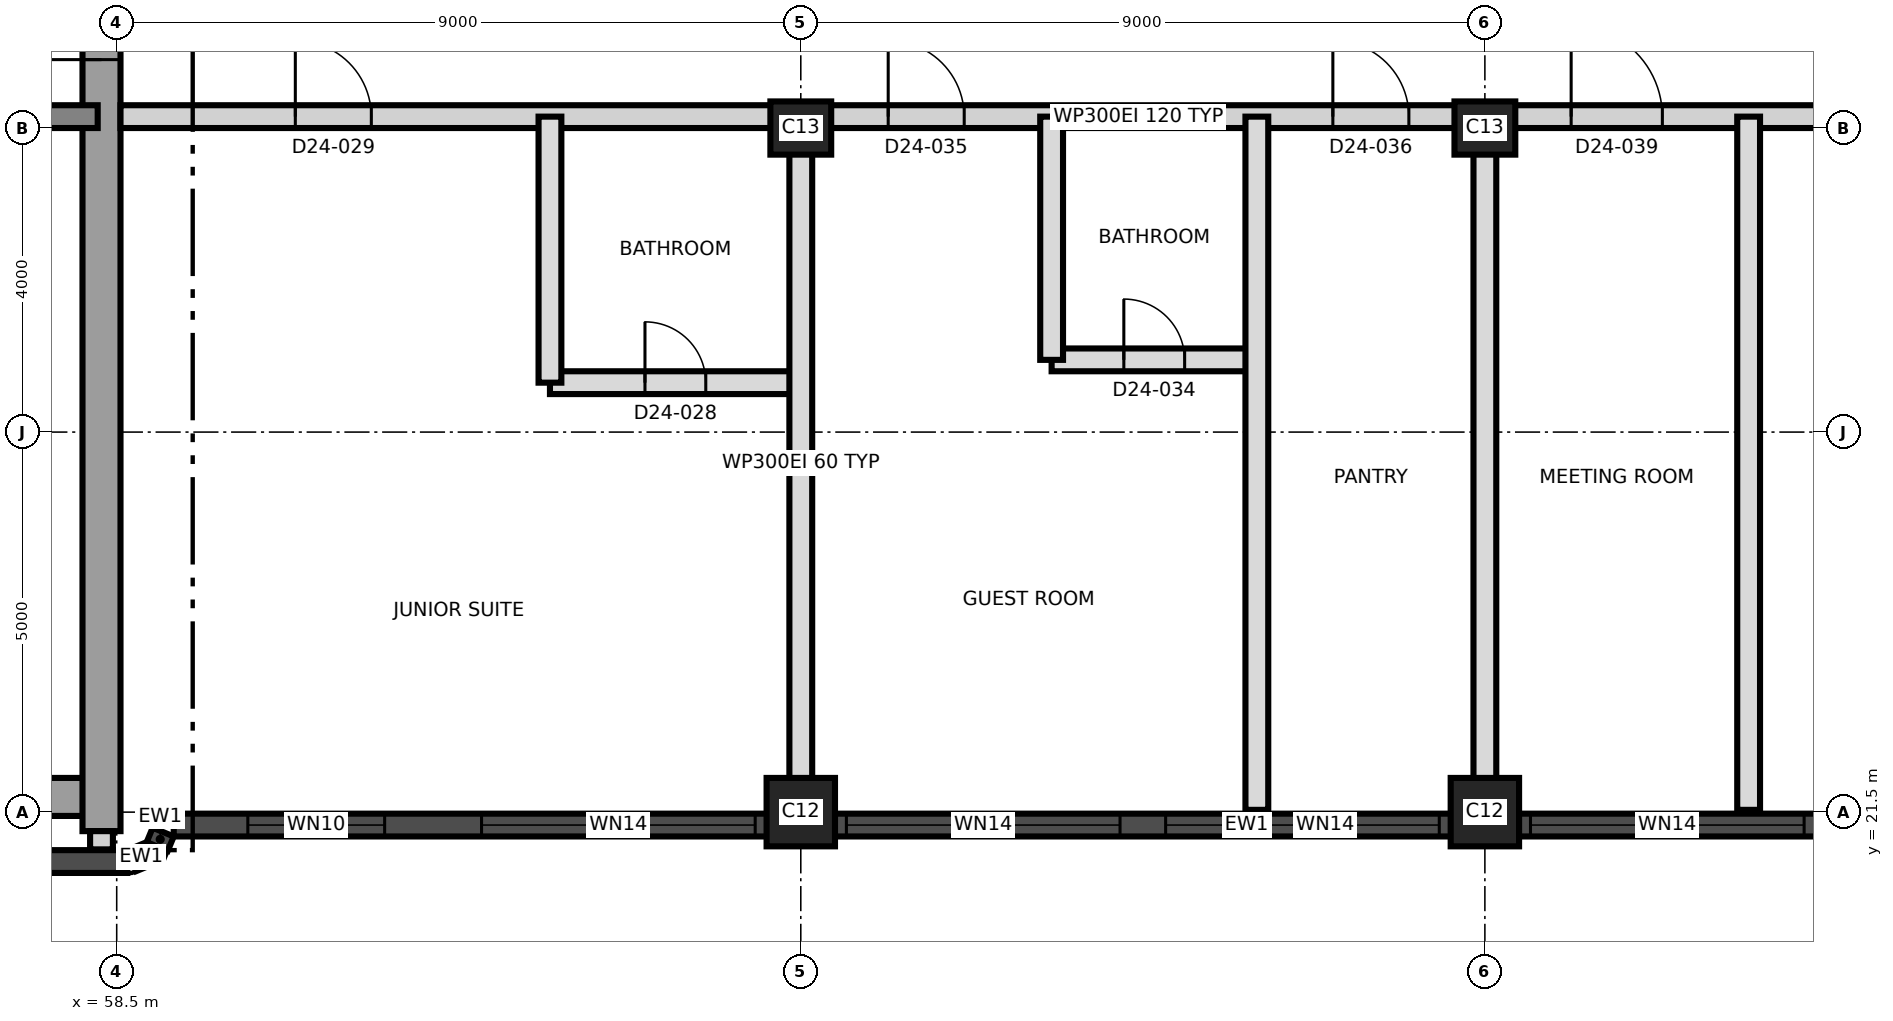
"""IFC4 building model, lengths in metres.
Left out: names, types, materials, properties, quantities, classifications, styles, units other than length and angle.
Written with IfcOpenShell. Run it as: python <this file> out.ifc"""

import sys

from ifc_helpers import new_model, si_unit, direction, frame, frame_2d, origin, origin_2d, place, context, subcontext, project, spatial, rectangle, extrude, element, fill, save


model = new_model("IFC4")
c1 = context("Model", 3, precision=1e-05, world=origin(), true_north=direction((0.0, 1.0)))
c2 = subcontext(c1, "Body", "Model", "MODEL_VIEW")
j1 = project(units=[si_unit("LENGTHUNIT", "METRE"), si_unit("PLANEANGLEUNIT", "RADIAN")], contexts=[c1])
p1 = place(None, origin())
s1 = spatial("IfcSite", under=j1, at=p1, CompositionType="ELEMENT")
p2 = place(p1, origin())
s2 = spatial("IfcBuilding", under=s1, at=p2, CompositionType="ELEMENT")
p3 = place(p2, frame((0.0, 0.0, 221.7)))
s3 = spatial("IfcBuildingStorey", under=s2, at=p3, CompositionType="ELEMENT", Elevation=221.7)
p4 = place(p3, frame((31.25, 21.7, 0.0), z_axis=(0.0, 0.0, 1.0), x_axis=(1.0, 0.0, 0.0)))
e1 = element("IfcWall", 1, at=p4, inside=s3, PredefinedType="SHEAR", context=c2, shape_type="SweptSolid", body=[
    extrude(rectangle(XDim=27.0, YDim=0.5, at=frame_2d((13.5, 0.0))), origin(), (0.0, 0.0, 1.0), 3.7),
])
p5 = place(p3, frame((58.3, 21.25, 0.0), z_axis=(0.0, 0.0, 1.0), x_axis=(0.0, 1.0, 0.0)))
e2 = element("IfcWall", 2, at=p5, inside=s3, PredefinedType="SHEAR", context=c2, shape_type="SweptSolid", body=[
    extrude(rectangle(XDim=18.5, YDim=0.5, at=frame_2d((9.25, 0.0))), origin(), (0.0, 0.0, 1.0), 3.7),
])
p6 = place(p5, frame((10.15, 0.0, 0.0)))
e3 = element("IfcOpeningElement", 3, at=p6, cuts=e2, PredefinedType="OPENING", context=c2, shape_type="SweptSolid", body=[
    extrude(rectangle(XDim=1.2, YDim=2.1, at=frame_2d((0.6, 1.05))), frame((0.0, 0.26, 0.0), z_axis=(0.0, -1.0, 0.0), x_axis=(1.0, 0.0, 0.0)), (0.0, 0.0, 1.0), 0.52),
])
p7 = place(p3, frame((31.75, 30.65, 0.0), z_axis=(0.0, 0.0, 1.0), x_axis=(1.0, 0.0, 0.0)))
e4 = element("IfcWall", 4, at=p7, inside=s3, PredefinedType="SHEAR", context=c2, shape_type="SweptSolid", body=[
    extrude(rectangle(XDim=26.5, YDim=0.3, at=frame_2d((13.25, 0.0))), origin(), (0.0, 0.0, 1.0), 3.7),
])
p8 = place(p7, frame((24.75, 0.0, 0.0)))
e5 = element("IfcOpeningElement", 5, at=p8, cuts=e4, PredefinedType="OPENING", context=c2, shape_type="SweptSolid", body=[
    extrude(rectangle(XDim=1.0, YDim=2.1, at=frame_2d((0.5, 1.05))), frame((0.0, 0.16, 0.0), z_axis=(0.0, -1.0, 0.0), x_axis=(1.0, 0.0, 0.0)), (0.0, 0.0, 1.0), 0.32),
])
for number, where, z_axis, x_axis in (
    (6, (67.5, 21.5, 0.0), (0.0, 0.0, 1.0), (1.0, 0.0, 0.0)),
    (7, (76.5, 21.5, 0.0), (0.0, 0.0, 1.0), (1.0, 0.0, 0.0)),
):
    element("IfcColumn", number, at=place(p3, frame(where, z_axis=z_axis, x_axis=x_axis)), inside=s3, PredefinedType="COLUMN", context=c2, shape_type="SweptSolid", body=[
        extrude(rectangle(XDim=0.9, YDim=0.9, at=origin_2d()), origin(), (0.0, 0.0, 1.0), 3.7),
    ])
for number, where, z_axis, x_axis in (
    (8, (67.5, 30.5, 0.0), (0.0, 0.0, 1.0), (1.0, 0.0, 0.0)),
    (9, (76.5, 30.5, 0.0), (0.0, 0.0, 1.0), (1.0, 0.0, 0.0)),
):
    element("IfcColumn", number, at=place(p3, frame(where, z_axis=z_axis, x_axis=x_axis)), inside=s3, PredefinedType="COLUMN", context=c2, shape_type="SweptSolid", body=[
        extrude(rectangle(XDim=0.8, YDim=0.7, at=origin_2d()), origin(), (0.0, 0.0, 1.0), 3.7),
    ])
p9 = place(p3, frame((31.36, 20.85, 0.0), z_axis=(0.0, 0.0, 1.0), x_axis=(1.0, 0.0, 0.0)))
e10 = element("IfcWall", 10, at=p9, inside=s3, PredefinedType="SOLIDWALL", context=c2, shape_type="SweptSolid", body=[
    extrude(rectangle(XDim=27.281, YDim=0.3, at=frame_2d((13.64, 0.0))), origin(), (0.0, 0.0, 1.0), 3.4),
])
p10 = place(p3, frame((58.698, 20.861, 0.0), z_axis=(0.0, 0.0, 1.0), x_axis=(0.923757413239, 0.38297812142, 0.0)))
e11 = element("IfcWall", 11, at=p10, inside=s3, PredefinedType="SOLIDWALL", context=c2, shape_type="SweptSolid", body=[
    extrude(rectangle(XDim=0.275, YDim=0.3, at=frame_2d((0.138, 0.0))), origin(), (0.0, 0.0, 1.0), 3.4),
])
p11 = place(p3, frame((59.033, 21.048, 0.0), z_axis=(0.0, 0.0, 1.0), x_axis=(0.383262727373, 0.923639367831, 0.0)))
e12 = element("IfcWall", 12, at=p11, inside=s3, PredefinedType="SOLIDWALL", context=c2, shape_type="SweptSolid", body=[
    extrude(rectangle(XDim=0.205, YDim=0.3, at=frame_2d((0.103, 0.0))), origin(), (0.0, 0.0, 1.0), 3.4),
])
p12 = place(p3, frame((59.25, 21.33, 0.0), z_axis=(0.0, 0.0, 1.0), x_axis=(1.0, 0.0, 0.0)))
e13 = element("IfcWall", 13, at=p12, inside=s3, PredefinedType="SOLIDWALL", context=c2, shape_type="SweptSolid", body=[
    extrude(rectangle(XDim=28.234, YDim=0.3, at=frame_2d((14.117, 0.0))), origin(), (0.0, 0.0, 1.0), 3.4),
])
p13 = place(p12, frame((0.975, 0.0, 0.3)))
e14 = element("IfcOpeningElement", 14, at=p13, cuts=e13, PredefinedType="OPENING", context=c2, shape_type="SweptSolid", body=[
    extrude(rectangle(XDim=1.8, YDim=2.4, at=frame_2d((0.9, 1.2))), frame((0.0, 0.16, 0.0), z_axis=(0.0, -1.0, 0.0), x_axis=(1.0, 0.0, 0.0)), (0.0, 0.0, 1.0), 0.32),
])
p14 = place(p12, frame((4.05, 0.0, 0.9)))
e15 = element("IfcOpeningElement", 15, at=p14, cuts=e13, PredefinedType="OPENING", context=c2, shape_type="SweptSolid", body=[
    extrude(rectangle(XDim=3.6, YDim=1.7, at=frame_2d((1.8, 0.85))), frame((0.0, 0.16, 0.0), z_axis=(0.0, -1.0, 0.0), x_axis=(1.0, 0.0, 0.0)), (0.0, 0.0, 1.0), 0.32),
])
p15 = place(p12, frame((8.85, 0.0, 0.9)))
e16 = element("IfcOpeningElement", 16, at=p15, cuts=e13, PredefinedType="OPENING", context=c2, shape_type="SweptSolid", body=[
    extrude(rectangle(XDim=3.6, YDim=1.7, at=frame_2d((1.8, 0.85))), frame((0.0, 0.16, 0.0), z_axis=(0.0, -1.0, 0.0), x_axis=(1.0, 0.0, 0.0)), (0.0, 0.0, 1.0), 0.32),
])
p16 = place(p12, frame((13.05, 0.0, 0.9)))
e17 = element("IfcOpeningElement", 17, at=p16, cuts=e13, PredefinedType="OPENING", context=c2, shape_type="SweptSolid", body=[
    extrude(rectangle(XDim=3.6, YDim=1.7, at=frame_2d((1.8, 0.85))), frame((0.0, 0.16, 0.0), z_axis=(0.0, -1.0, 0.0), x_axis=(1.0, 0.0, 0.0)), (0.0, 0.0, 1.0), 0.32),
])
p17 = place(p12, frame((17.85, 0.0, 0.9)))
e18 = element("IfcOpeningElement", 18, at=p17, cuts=e13, PredefinedType="OPENING", context=c2, shape_type="SweptSolid", body=[
    extrude(rectangle(XDim=3.6, YDim=1.7, at=frame_2d((1.8, 0.85))), frame((0.0, 0.16, 0.0), z_axis=(0.0, -1.0, 0.0), x_axis=(1.0, 0.0, 0.0)), (0.0, 0.0, 1.0), 0.32),
])
p18 = place(p12, frame((22.05, 0.0, 0.9)))
e19 = element("IfcOpeningElement", 19, at=p18, cuts=e13, PredefinedType="OPENING", context=c2, shape_type="SweptSolid", body=[
    extrude(rectangle(XDim=3.6, YDim=1.7, at=frame_2d((1.8, 0.85))), frame((0.0, 0.16, 0.0), z_axis=(0.0, -1.0, 0.0), x_axis=(1.0, 0.0, 0.0)), (0.0, 0.0, 1.0), 0.32),
])
p19 = place(p3, frame((64.2, 27.15, 0.0), z_axis=(0.0, 0.0, 1.0), x_axis=(1.0, 0.0, 0.0)))
e20 = element("IfcWall", 20, at=p19, inside=s3, PredefinedType="PARTITIONING", context=c2, shape_type="SweptSolid", body=[
    extrude(rectangle(XDim=3.3, YDim=0.3, at=frame_2d((1.65, 0.0))), origin(), (0.0, 0.0, 1.0), 3.4),
])
p20 = place(p19, frame((1.25, 0.0, 0.0)))
e21 = element("IfcOpeningElement", 21, at=p20, cuts=e20, PredefinedType="OPENING", context=c2, shape_type="SweptSolid", body=[
    extrude(rectangle(XDim=0.8, YDim=2.1, at=frame_2d((0.4, 1.05))), frame((0.0, 0.16, 0.0), z_axis=(0.0, -1.0, 0.0), x_axis=(1.0, 0.0, 0.0)), (0.0, 0.0, 1.0), 0.32),
])
p21 = place(p3, frame((70.8, 27.45, 0.0), z_axis=(0.0, 0.0, 1.0), x_axis=(1.0, 0.0, 0.0)))
e22 = element("IfcWall", 22, at=p21, inside=s3, PredefinedType="PARTITIONING", context=c2, shape_type="SweptSolid", body=[
    extrude(rectangle(XDim=2.7, YDim=0.3, at=frame_2d((1.35, 0.0))), origin(), (0.0, 0.0, 1.0), 3.4),
])
p22 = place(p21, frame((0.95, 0.0, 0.0)))
e23 = element("IfcOpeningElement", 23, at=p22, cuts=e22, PredefinedType="OPENING", context=c2, shape_type="SweptSolid", body=[
    extrude(rectangle(XDim=0.8, YDim=2.1, at=frame_2d((0.4, 1.05))), frame((0.0, 0.16, 0.0), z_axis=(0.0, -1.0, 0.0), x_axis=(1.0, 0.0, 0.0)), (0.0, 0.0, 1.0), 0.32),
])
p23 = place(p3, frame((58.55, 30.65, 0.0), z_axis=(0.0, 0.0, 1.0), x_axis=(1.0, 0.0, 0.0)))
e24 = element("IfcWall", 24, at=p23, inside=s3, PredefinedType="PARTITIONING", context=c2, shape_type="SweptSolid", body=[
    extrude(rectangle(XDim=26.78, YDim=0.3, at=frame_2d((13.39, 0.0))), origin(), (0.0, 0.0, 1.0), 3.4),
])
p24 = place(p23, frame((2.3, 0.0, 0.0)))
e25 = element("IfcOpeningElement", 25, at=p24, cuts=e24, PredefinedType="OPENING", context=c2, shape_type="SweptSolid", body=[
    extrude(rectangle(XDim=1.0, YDim=2.4, at=frame_2d((0.5, 1.2))), frame((0.0, 0.16, 0.0), z_axis=(0.0, -1.0, 0.0), x_axis=(1.0, 0.0, 0.0)), (0.0, 0.0, 1.0), 0.32),
])
p25 = place(p23, frame((10.1, 0.0, 0.0)))
e26 = element("IfcOpeningElement", 26, at=p25, cuts=e24, PredefinedType="OPENING", context=c2, shape_type="SweptSolid", body=[
    extrude(rectangle(XDim=1.0, YDim=2.1, at=frame_2d((0.5, 1.05))), frame((0.0, 0.16, 0.0), z_axis=(0.0, -1.0, 0.0), x_axis=(1.0, 0.0, 0.0)), (0.0, 0.0, 1.0), 0.32),
])
p26 = place(p23, frame((15.95, 0.0, 0.0)))
e27 = element("IfcOpeningElement", 27, at=p26, cuts=e24, PredefinedType="OPENING", context=c2, shape_type="SweptSolid", body=[
    extrude(rectangle(XDim=1.0, YDim=2.1, at=frame_2d((0.5, 1.05))), frame((0.0, 0.16, 0.0), z_axis=(0.0, -1.0, 0.0), x_axis=(1.0, 0.0, 0.0)), (0.0, 0.0, 1.0), 0.32),
])
p27 = place(p23, frame((19.085, 0.0, 0.0)))
e28 = element("IfcOpeningElement", 28, at=p27, cuts=e24, PredefinedType="OPENING", context=c2, shape_type="SweptSolid", body=[
    extrude(rectangle(XDim=1.2, YDim=2.1, at=frame_2d((0.6, 1.05))), frame((0.0, 0.16, 0.0), z_axis=(0.0, -1.0, 0.0), x_axis=(1.0, 0.0, 0.0)), (0.0, 0.0, 1.0), 0.32),
])
p28 = place(p23, frame((22.335, 0.0, 0.0)))
e29 = element("IfcOpeningElement", 29, at=p28, cuts=e24, PredefinedType="OPENING", context=c2, shape_type="SweptSolid", body=[
    extrude(rectangle(XDim=1.0, YDim=2.1, at=frame_2d((0.5, 1.05))), frame((0.0, 0.16, 0.0), z_axis=(0.0, -1.0, 0.0), x_axis=(1.0, 0.0, 0.0)), (0.0, 0.0, 1.0), 0.32),
])
p29 = place(p3, frame((64.2, 27.15, 0.0), z_axis=(0.0, 0.0, 1.0), x_axis=(0.0, 1.0, 0.0)))
e30 = element("IfcWall", 30, at=p29, inside=s3, PredefinedType="PARTITIONING", context=c2, shape_type="SweptSolid", body=[
    extrude(rectangle(XDim=3.5, YDim=0.3, at=frame_2d((1.75, 0.0))), origin(), (0.0, 0.0, 1.0), 3.4),
])
p30 = place(p3, frame((67.5, 21.53, 0.0), z_axis=(0.0, 0.0, 1.0), x_axis=(0.0, 1.0, 0.0)))
e31 = element("IfcWall", 31, at=p30, inside=s3, PredefinedType="PARTITIONING", context=c2, shape_type="SweptSolid", body=[
    extrude(rectangle(XDim=9.12, YDim=0.3, at=frame_2d((4.56, 0.0))), origin(), (0.0, 0.0, 1.0), 3.4),
])
p31 = place(p3, frame((70.8, 27.45, 0.0), z_axis=(0.0, 0.0, 1.0), x_axis=(0.0, 1.0, 0.0)))
e32 = element("IfcWall", 32, at=p31, inside=s3, PredefinedType="PARTITIONING", context=c2, shape_type="SweptSolid", body=[
    extrude(rectangle(XDim=3.2, YDim=0.3, at=frame_2d((1.6, 0.0))), origin(), (0.0, 0.0, 1.0), 3.4),
])
for number, where, z_axis, x_axis in (
    (33, (73.5, 21.53, 0.0), (0.0, 0.0, 1.0), (0.0, 1.0, 0.0)),
    (34, (76.5, 21.53, 0.0), (0.0, 0.0, 1.0), (0.0, 1.0, 0.0)),
    (35, (79.97, 21.53, 0.0), (0.0, 0.0, 1.0), (0.0, 1.0, 0.0)),
):
    element("IfcWall", number, at=place(p3, frame(where, z_axis=z_axis, x_axis=x_axis)), inside=s3, PredefinedType="PARTITIONING", context=c2, shape_type="SweptSolid", body=[
        extrude(rectangle(XDim=9.12, YDim=0.3, at=frame_2d((4.56, 0.0))), origin(), (0.0, 0.0, 1.0), 3.4),
    ])
p32 = place(p3, frame((58.3, 21.25, 0.0), z_axis=(0.0, 0.0, 1.0), x_axis=(0.0, -1.0, 0.0)))
e36 = element("IfcWall", 36, at=p32, inside=s3, PredefinedType="PARTITIONING", context=c2, shape_type="SweptSolid", body=[
    extrude(rectangle(XDim=0.24, YDim=0.3, at=frame_2d((0.12, 0.0))), origin(), (0.0, 0.0, 1.0), 3.4),
])
p33 = place(p13, origin())
e37 = element("IfcWindow", 37, at=p33, inside=s3, PartitioningType="SINGLE_PANEL", PredefinedType="WINDOW", context=c2, shape_type="SweptSolid", body=[
    extrude(rectangle(XDim=1.8, YDim=2.4, at=frame_2d((0.9, 1.2))), frame((0.0, 0.03, 0.0), z_axis=(0.0, -1.0, 0.0), x_axis=(1.0, 0.0, 0.0)), (0.0, 0.0, 1.0), 0.06),
])
fill(e14, e37)
p34 = place(p14, origin())
e38 = element("IfcWindow", 38, at=p34, inside=s3, PartitioningType="SINGLE_PANEL", PredefinedType="WINDOW", context=c2, shape_type="SweptSolid", body=[
    extrude(rectangle(XDim=3.6, YDim=1.7, at=frame_2d((1.8, 0.85))), frame((0.0, 0.03, 0.0), z_axis=(0.0, -1.0, 0.0), x_axis=(1.0, 0.0, 0.0)), (0.0, 0.0, 1.0), 0.06),
])
fill(e15, e38)
p35 = place(p15, origin())
e39 = element("IfcWindow", 39, at=p35, inside=s3, PartitioningType="SINGLE_PANEL", PredefinedType="WINDOW", context=c2, shape_type="SweptSolid", body=[
    extrude(rectangle(XDim=3.6, YDim=1.7, at=frame_2d((1.8, 0.85))), frame((0.0, 0.03, 0.0), z_axis=(0.0, -1.0, 0.0), x_axis=(1.0, 0.0, 0.0)), (0.0, 0.0, 1.0), 0.06),
])
fill(e16, e39)
p36 = place(p16, origin())
e40 = element("IfcWindow", 40, at=p36, inside=s3, PartitioningType="SINGLE_PANEL", PredefinedType="WINDOW", context=c2, shape_type="SweptSolid", body=[
    extrude(rectangle(XDim=3.6, YDim=1.7, at=frame_2d((1.8, 0.85))), frame((0.0, 0.03, 0.0), z_axis=(0.0, -1.0, 0.0), x_axis=(1.0, 0.0, 0.0)), (0.0, 0.0, 1.0), 0.06),
])
fill(e17, e40)
p37 = place(p17, origin())
e41 = element("IfcWindow", 41, at=p37, inside=s3, PartitioningType="SINGLE_PANEL", PredefinedType="WINDOW", context=c2, shape_type="SweptSolid", body=[
    extrude(rectangle(XDim=3.6, YDim=1.7, at=frame_2d((1.8, 0.85))), frame((0.0, 0.03, 0.0), z_axis=(0.0, -1.0, 0.0), x_axis=(1.0, 0.0, 0.0)), (0.0, 0.0, 1.0), 0.06),
])
fill(e18, e41)
p38 = place(p6, origin())
e42 = element("IfcDoor", 42, at=p38, inside=s3, OperationType="SINGLE_SWING_LEFT", PredefinedType="DOOR", context=c2, shape_type="SweptSolid", body=[
    extrude(rectangle(XDim=1.2, YDim=2.1, at=frame_2d((0.6, 1.05))), frame((0.0, 0.025, 0.0), z_axis=(0.0, -1.0, 0.0), x_axis=(1.0, 0.0, 0.0)), (0.0, 0.0, 1.0), 0.05),
])
fill(e3, e42)
p39 = place(p20, origin())
e43 = element("IfcDoor", 43, at=p39, inside=s3, OperationType="SINGLE_SWING_LEFT", PredefinedType="DOOR", context=c2, shape_type="SweptSolid", body=[
    extrude(rectangle(XDim=0.8, YDim=2.1, at=frame_2d((0.4, 1.05))), frame((0.0, 0.025, 0.0), z_axis=(0.0, -1.0, 0.0), x_axis=(1.0, 0.0, 0.0)), (0.0, 0.0, 1.0), 0.05),
])
fill(e21, e43)
p40 = place(p24, origin())
e44 = element("IfcDoor", 44, at=p40, inside=s3, OperationType="SINGLE_SWING_LEFT", PredefinedType="DOOR", context=c2, shape_type="SweptSolid", body=[
    extrude(rectangle(XDim=1.0, YDim=2.4, at=frame_2d((0.5, 1.2))), frame((0.0, 0.025, 0.0), z_axis=(0.0, -1.0, 0.0), x_axis=(1.0, 0.0, 0.0)), (0.0, 0.0, 1.0), 0.05),
])
fill(e25, e44)
p41 = place(p22, origin())
e45 = element("IfcDoor", 45, at=p41, inside=s3, OperationType="SINGLE_SWING_LEFT", PredefinedType="DOOR", context=c2, shape_type="SweptSolid", body=[
    extrude(rectangle(XDim=0.8, YDim=2.1, at=frame_2d((0.4, 1.05))), frame((0.0, 0.025, 0.0), z_axis=(0.0, -1.0, 0.0), x_axis=(1.0, 0.0, 0.0)), (0.0, 0.0, 1.0), 0.05),
])
fill(e23, e45)
p42 = place(p25, origin())
e46 = element("IfcDoor", 46, at=p42, inside=s3, OperationType="SINGLE_SWING_LEFT", PredefinedType="DOOR", context=c2, shape_type="SweptSolid", body=[
    extrude(rectangle(XDim=1.0, YDim=2.1, at=frame_2d((0.5, 1.05))), frame((0.0, 0.025, 0.0), z_axis=(0.0, -1.0, 0.0), x_axis=(1.0, 0.0, 0.0)), (0.0, 0.0, 1.0), 0.05),
])
fill(e26, e46)
p43 = place(p26, origin())
e47 = element("IfcDoor", 47, at=p43, inside=s3, OperationType="SINGLE_SWING_RIGHT", PredefinedType="DOOR", context=c2, shape_type="SweptSolid", body=[
    extrude(rectangle(XDim=1.0, YDim=2.1, at=frame_2d((0.5, 1.05))), frame((0.0, 0.025, 0.0), z_axis=(0.0, -1.0, 0.0), x_axis=(1.0, 0.0, 0.0)), (0.0, 0.0, 1.0), 0.05),
])
fill(e27, e47)
p44 = place(p27, origin())
e48 = element("IfcDoor", 48, at=p44, inside=s3, OperationType="SINGLE_SWING_RIGHT", PredefinedType="DOOR", context=c2, shape_type="SweptSolid", body=[
    extrude(rectangle(XDim=1.2, YDim=2.1, at=frame_2d((0.6, 1.05))), frame((0.0, 0.025, 0.0), z_axis=(0.0, -1.0, 0.0), x_axis=(1.0, 0.0, 0.0)), (0.0, 0.0, 1.0), 0.05),
])
fill(e28, e48)
save(model, sys.argv[1])
